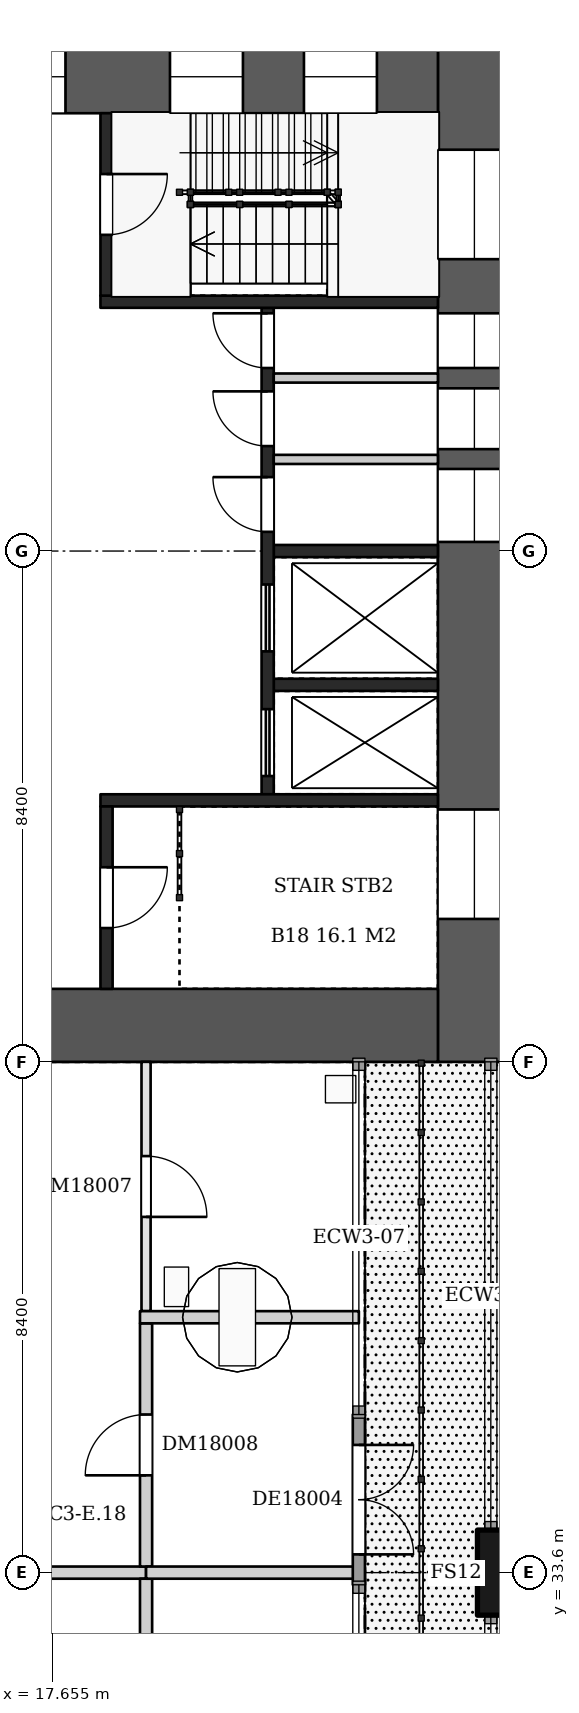
"""IFC4 building model, lengths in metres.
Left out: names, types, materials, properties, quantities, classifications, styles, units other than length and angle.
Written with IfcOpenShell. Run it as: python <this file> out.ifc"""

import sys

from ifc_helpers import new_model, si_unit, direction, frame, frame_2d, origin, origin_2d, place, context, subcontext, project, spatial, rectangle, extrude, element, fill, save


model = new_model("IFC4")
c1 = context("Model", 3, precision=1e-05, world=origin(), true_north=direction((0.0, 1.0)))
c2 = subcontext(c1, "Body", "Model", "MODEL_VIEW")
j1 = project(units=[si_unit("LENGTHUNIT", "METRE"), si_unit("PLANEANGLEUNIT", "RADIAN")], contexts=[c1])
p1 = place(None, origin())
s1 = spatial("IfcSite", under=j1, at=p1, CompositionType="ELEMENT")
p2 = place(p1, origin())
s2 = spatial("IfcBuilding", under=s1, at=p2, CompositionType="ELEMENT")
p3 = place(p2, frame((0.0, 0.0, 74.2)))
s3 = spatial("IfcBuildingStorey", under=s2, at=p3, CompositionType="ELEMENT", Elevation=74.2)
p4 = place(p3, frame((25.2, 33.6, 0.0), z_axis=(0.0, 0.0, 1.0), x_axis=(0.0, 1.0, 0.0)))
e1 = element("IfcColumn", 1, at=p4, inside=s3, PredefinedType="COLUMN", context=c2, shape_type="SweptSolid", body=[
    extrude(rectangle(XDim=1.4, YDim=1.1, at=origin_2d()), origin(), (0.0, 0.0, 1.0), 6.72),
])
p5 = place(p3, frame((24.6, 58.8, 0.0), z_axis=(0.0, 0.0, 1.0), x_axis=(0.0, -1.0, 0.0)))
e2 = element("IfcWall", 2, at=p5, inside=s3, PredefinedType="SHEAR", context=c2, shape_type="SweptSolid", body=[
    extrude(rectangle(XDim=16.8, YDim=1.2, at=frame_2d((8.4, 0.0))), origin(), (0.0, 0.0, 1.0), 6.72),
])
p6 = place(p5, frame((1.8, 0.0, 0.5)))
e3 = element("IfcOpeningElement", 3, at=p6, cuts=e2, PredefinedType="OPENING", context=c2, shape_type="SweptSolid", body=[
    extrude(rectangle(XDim=1.8, YDim=2.4, at=frame_2d((0.9, 1.2))), frame((0.0, 0.61, 0.0), z_axis=(0.0, -1.0, 0.0), x_axis=(1.0, 0.0, 0.0)), (0.0, 0.0, 1.0), 1.22),
])
p7 = place(p5, frame((4.49, 0.0, 1.6)))
e4 = element("IfcOpeningElement", 4, at=p7, cuts=e2, PredefinedType="OPENING", context=c2, shape_type="SweptSolid", body=[
    extrude(rectangle(XDim=0.9, YDim=1.2, at=frame_2d((0.45, 0.6))), frame((0.0, 0.61, 0.0), z_axis=(0.0, -1.0, 0.0), x_axis=(1.0, 0.0, 0.0)), (0.0, 0.0, 1.0), 1.22),
])
p8 = place(p5, frame((5.724, 0.0, 1.6)))
e5 = element("IfcOpeningElement", 5, at=p8, cuts=e2, PredefinedType="OPENING", context=c2, shape_type="SweptSolid", body=[
    extrude(rectangle(XDim=1.0, YDim=1.2, at=frame_2d((0.5, 0.6))), frame((0.0, 0.61, 0.0), z_axis=(0.0, -1.0, 0.0), x_axis=(1.0, 0.0, 0.0)), (0.0, 0.0, 1.0), 1.22),
])
p9 = place(p5, frame((7.05, 0.0, 1.6)))
e6 = element("IfcOpeningElement", 6, at=p9, cuts=e2, PredefinedType="OPENING", context=c2, shape_type="SweptSolid", body=[
    extrude(rectangle(XDim=1.2, YDim=1.2, at=frame_2d((0.6, 0.6))), frame((0.0, 0.61, 0.0), z_axis=(0.0, -1.0, 0.0), x_axis=(1.0, 0.0, 0.0)), (0.0, 0.0, 1.0), 1.22),
])
p10 = place(p5, frame((12.65, 0.0, 0.5)))
e7 = element("IfcOpeningElement", 7, at=p10, cuts=e2, PredefinedType="OPENING", context=c2, shape_type="SweptSolid", body=[
    extrude(rectangle(XDim=1.8, YDim=2.4, at=frame_2d((0.9, 1.2))), frame((0.0, 0.61, 0.0), z_axis=(0.0, -1.0, 0.0), x_axis=(1.0, 0.0, 0.0)), (0.0, 0.0, 1.0), 1.22),
])
p11 = place(p3, frame((9.6, 58.2, 0.0), z_axis=(0.0, 0.0, 1.0), x_axis=(1.0, 0.0, 0.0)))
e8 = element("IfcWall", 8, at=p11, inside=s3, PredefinedType="SHEAR", context=c2, shape_type="SweptSolid", body=[
    extrude(rectangle(XDim=14.4, YDim=1.2, at=frame_2d((7.2, 0.0))), origin(), (0.0, 0.0, 1.0), 6.72),
])
p12 = place(p11, frame((1.105, 0.0, 0.6)))
e9 = element("IfcOpeningElement", 9, at=p12, cuts=e8, PredefinedType="OPENING", context=c2, shape_type="SweptSolid", body=[
    extrude(rectangle(XDim=3.0, YDim=2.1, at=frame_2d((1.5, 1.05))), frame((0.0, 0.61, 0.0), z_axis=(0.0, -1.0, 0.0), x_axis=(1.0, 0.0, 0.0)), (0.0, 0.0, 1.0), 1.22),
])
p13 = place(p11, frame((5.875, 0.0, 0.6)))
e10 = element("IfcOpeningElement", 10, at=p13, cuts=e8, PredefinedType="OPENING", context=c2, shape_type="SweptSolid", body=[
    extrude(rectangle(XDim=2.4, YDim=2.1, at=frame_2d((1.2, 1.05))), frame((0.0, 0.61, 0.0), z_axis=(0.0, -1.0, 0.0), x_axis=(1.0, 0.0, 0.0)), (0.0, 0.0, 1.0), 1.22),
])
p14 = place(p11, frame((9.993, 0.0, 0.5)))
e11 = element("IfcOpeningElement", 11, at=p14, cuts=e8, PredefinedType="OPENING", context=c2, shape_type="SweptSolid", body=[
    extrude(rectangle(XDim=1.2, YDim=2.4, at=frame_2d((0.6, 1.2))), frame((0.0, 0.61, 0.0), z_axis=(0.0, -1.0, 0.0), x_axis=(1.0, 0.0, 0.0)), (0.0, 0.0, 1.0), 1.22),
])
p15 = place(p11, frame((12.197, 0.0, 0.5)))
e12 = element("IfcOpeningElement", 12, at=p15, cuts=e8, PredefinedType="OPENING", context=c2, shape_type="SweptSolid", body=[
    extrude(rectangle(XDim=1.2, YDim=2.4, at=frame_2d((0.6, 1.2))), frame((0.0, 0.61, 0.0), z_axis=(0.0, -1.0, 0.0), x_axis=(1.0, 0.0, 0.0)), (0.0, 0.0, 1.0), 1.22),
])
p16 = place(p3, frame((9.6, 42.6, 0.0), z_axis=(0.0, 0.0, 1.0), x_axis=(1.0, 0.0, 0.0)))
e13 = element("IfcWall", 13, at=p16, inside=s3, PredefinedType="SHEAR", context=c2, shape_type="SweptSolid", body=[
    extrude(rectangle(XDim=14.4, YDim=1.2, at=frame_2d((7.2, 0.0))), origin(), (0.0, 0.0, 1.0), 6.72),
])
p17 = place(p16, frame((2.1, 0.0, 0.0)))
e14 = element("IfcOpeningElement", 14, at=p17, cuts=e13, PredefinedType="OPENING", context=c2, shape_type="SweptSolid", body=[
    extrude(rectangle(XDim=1.8, YDim=2.1, at=frame_2d((0.9, 1.05))), frame((0.0, 0.61, 0.0), z_axis=(0.0, -1.0, 0.0), x_axis=(1.0, 0.0, 0.0)), (0.0, 0.0, 1.0), 1.22),
])
for number, where, z_axis, x_axis in (
    (15, (21.3, 50.4, 0.0), (0.0, 0.0, 1.0), (1.0, 0.0, 0.0)),
    (16, (21.3, 48.2, 0.0), (0.0, 0.0, 1.0), (1.0, 0.0, 0.0)),
):
    element("IfcWall", number, at=place(p3, frame(where, z_axis=z_axis, x_axis=x_axis)), inside=s3, PredefinedType="SHEAR", context=c2, shape_type="SweptSolid", body=[
        extrude(rectangle(XDim=2.7, YDim=0.2, at=frame_2d((1.35, 0.0))), origin(), (0.0, 0.0, 1.0), 6.72),
    ])
for number, where, z_axis, x_axis in (
    (17, (21.3, 53.245, 0.0), (0.0, 0.0, 1.0), (1.0, 0.0, 0.0)),
    (18, (21.3, 51.907, 0.0), (0.0, 0.0, 1.0), (1.0, 0.0, 0.0)),
):
    element("IfcWall", number, at=place(p3, frame(where, z_axis=z_axis, x_axis=x_axis)), inside=s3, PredefinedType="PARTITIONING", context=c2, shape_type="SweptSolid", body=[
        extrude(rectangle(XDim=2.7, YDim=0.15, at=frame_2d((1.35, 0.0))), origin(), (0.0, 0.0, 1.0), 6.72),
    ])
p18 = place(p3, frame((21.2, 54.4, 0.0), z_axis=(0.0, 0.0, 1.0), x_axis=(0.0, -1.0, 0.0)))
e19 = element("IfcWall", 19, at=p18, inside=s3, PredefinedType="SHEAR", context=c2, shape_type="SweptSolid", body=[
    extrude(rectangle(XDim=8.0, YDim=0.2, at=frame_2d((4.0, 0.0))), origin(), (0.0, 0.0, 1.0), 6.72),
])
p19 = place(p18, frame((0.09, 0.0, 0.0)))
e20 = element("IfcOpeningElement", 20, at=p19, cuts=e19, PredefinedType="OPENING", context=c2, shape_type="SweptSolid", body=[
    extrude(rectangle(XDim=0.9, YDim=2.1, at=frame_2d((0.45, 1.05))), frame((0.0, 0.11, 0.0), z_axis=(0.0, -1.0, 0.0), x_axis=(1.0, 0.0, 0.0)), (0.0, 0.0, 1.0), 0.22),
])
p20 = place(p18, frame((1.374, 0.0, 0.0)))
e21 = element("IfcOpeningElement", 21, at=p20, cuts=e19, PredefinedType="OPENING", context=c2, shape_type="SweptSolid", body=[
    extrude(rectangle(XDim=0.9, YDim=2.1, at=frame_2d((0.45, 1.05))), frame((0.0, 0.11, 0.0), z_axis=(0.0, -1.0, 0.0), x_axis=(1.0, 0.0, 0.0)), (0.0, 0.0, 1.0), 0.22),
])
p21 = place(p18, frame((2.784, 0.0, 0.0)))
e22 = element("IfcOpeningElement", 22, at=p21, cuts=e19, PredefinedType="OPENING", context=c2, shape_type="SweptSolid", body=[
    extrude(rectangle(XDim=0.9, YDim=2.1, at=frame_2d((0.45, 1.05))), frame((0.0, 0.11, 0.0), z_axis=(0.0, -1.0, 0.0), x_axis=(1.0, 0.0, 0.0)), (0.0, 0.0, 1.0), 0.22),
])
p22 = place(p18, frame((4.55, 0.0, 0.0)))
e23 = element("IfcOpeningElement", 23, at=p22, cuts=e19, PredefinedType="OPENING", context=c2, shape_type="SweptSolid", body=[
    extrude(rectangle(XDim=1.1, YDim=2.1, at=frame_2d((0.55, 1.05))), frame((0.0, 0.11, 0.0), z_axis=(0.0, -1.0, 0.0), x_axis=(1.0, 0.0, 0.0)), (0.0, 0.0, 1.0), 0.22),
])
p23 = place(p18, frame((6.6, 0.0, 0.0)))
e24 = element("IfcOpeningElement", 24, at=p23, cuts=e19, PredefinedType="OPENING", context=c2, shape_type="SweptSolid", body=[
    extrude(rectangle(XDim=1.1, YDim=2.1, at=frame_2d((0.55, 1.05))), frame((0.0, 0.11, 0.0), z_axis=(0.0, -1.0, 0.0), x_axis=(1.0, 0.0, 0.0)), (0.0, 0.0, 1.0), 0.22),
])
p24 = place(p3, frame((18.45, 54.5, 0.0), z_axis=(0.0, 0.0, 1.0), x_axis=(1.0, 0.0, 0.0)))
e25 = element("IfcWall", 25, at=p24, inside=s3, PredefinedType="SHEAR", context=c2, shape_type="SweptSolid", body=[
    extrude(rectangle(XDim=5.55, YDim=0.2, at=frame_2d((2.775, 0.0))), origin(), (0.0, 0.0, 1.0), 6.72),
])
p25 = place(p3, frame((18.55, 57.6, 0.0), z_axis=(0.0, 0.0, 1.0), x_axis=(0.0, -1.0, 0.0)))
e26 = element("IfcWall", 26, at=p25, inside=s3, PredefinedType="SHEAR", context=c2, shape_type="SweptSolid", body=[
    extrude(rectangle(XDim=3.0, YDim=0.2, at=frame_2d((1.5, 0.0))), origin(), (0.0, 0.0, 1.0), 6.72),
])
p26 = place(p25, frame((1.0, 0.0, 0.0)))
e27 = element("IfcOpeningElement", 27, at=p26, cuts=e26, PredefinedType="OPENING", context=c2, shape_type="SweptSolid", body=[
    extrude(rectangle(XDim=1.0, YDim=2.1, at=frame_2d((0.5, 1.05))), frame((0.0, 0.11, 0.0), z_axis=(0.0, -1.0, 0.0), x_axis=(1.0, 0.0, 0.0)), (0.0, 0.0, 1.0), 0.22),
])
p27 = place(p3, frame((18.45, 46.3, 0.0), z_axis=(0.0, 0.0, 1.0), x_axis=(1.0, 0.0, 0.0)))
e28 = element("IfcWall", 28, at=p27, inside=s3, PredefinedType="SHEAR", context=c2, shape_type="SweptSolid", body=[
    extrude(rectangle(XDim=5.55, YDim=0.2, at=frame_2d((2.775, 0.0))), origin(), (0.0, 0.0, 1.0), 6.72),
])
p28 = place(p3, frame((18.55, 46.2, 0.0), z_axis=(0.0, 0.0, 1.0), x_axis=(0.0, -1.0, 0.0)))
e29 = element("IfcWall", 29, at=p28, inside=s3, PredefinedType="SHEAR", context=c2, shape_type="SweptSolid", body=[
    extrude(rectangle(XDim=3.0, YDim=0.2, at=frame_2d((1.5, 0.0))), origin(), (0.0, 0.0, 1.0), 6.72),
])
p29 = place(p28, frame((1.0, 0.0, 0.0)))
e30 = element("IfcOpeningElement", 30, at=p29, cuts=e29, PredefinedType="OPENING", context=c2, shape_type="SweptSolid", body=[
    extrude(rectangle(XDim=1.0, YDim=2.1, at=frame_2d((0.5, 1.05))), frame((0.0, 0.11, 0.0), z_axis=(0.0, -1.0, 0.0), x_axis=(1.0, 0.0, 0.0)), (0.0, 0.0, 1.0), 0.22),
])
p30 = place(p3, frame((17.45, 33.6, 0.0), z_axis=(0.0, 0.0, 1.0), x_axis=(1.0, 0.0, 0.0)))
e31 = element("IfcWall", 31, at=p30, inside=s3, PredefinedType="PARTITIONING", context=c2, shape_type="SweptSolid", body=[
    extrude(rectangle(XDim=1.75, YDim=0.2, at=frame_2d((0.875, 0.0))), origin(), (0.0, 0.0, 1.0), 6.72),
])
p31 = place(p3, frame((19.2, 25.3, 0.0), z_axis=(0.0, 0.0, 1.0), x_axis=(0.0, 1.0, 0.0)))
e32 = element("IfcWall", 32, at=p31, inside=s3, PredefinedType="PARTITIONING", context=c2, shape_type="SweptSolid", body=[
    extrude(rectangle(XDim=8.2, YDim=0.2, at=frame_2d((4.1, 0.0))), origin(), (0.0, 0.0, 1.0), 6.72),
])
p32 = place(p31, frame((3.1, 0.0, 0.0)))
e33 = element("IfcOpeningElement", 33, at=p32, cuts=e32, PredefinedType="OPENING", context=c2, shape_type="SweptSolid", body=[
    extrude(rectangle(XDim=2.0, YDim=2.1, at=frame_2d((1.0, 1.05))), frame((0.0, 0.11, 0.0), z_axis=(0.0, -1.0, 0.0), x_axis=(1.0, 0.0, 0.0)), (0.0, 0.0, 1.0), 0.22),
])
p33 = place(p3, frame((19.2, 33.7, 0.0), z_axis=(0.0, 0.0, 1.0), x_axis=(0.0, 1.0, 0.0)))
e34 = element("IfcWall", 34, at=p33, inside=s3, PredefinedType="PARTITIONING", context=c2, shape_type="SweptSolid", body=[
    extrude(rectangle(XDim=4.0, YDim=0.2, at=frame_2d((2.0, 0.0))), origin(), (0.0, 0.0, 1.0), 6.72),
])
p34 = place(p33, frame((1.5, 0.0, 0.0)))
e35 = element("IfcOpeningElement", 35, at=p34, cuts=e34, PredefinedType="OPENING", context=c2, shape_type="SweptSolid", body=[
    extrude(rectangle(XDim=1.0, YDim=2.1, at=frame_2d((0.5, 1.05))), frame((0.0, 0.11, 0.0), z_axis=(0.0, -1.0, 0.0), x_axis=(1.0, 0.0, 0.0)), (0.0, 0.0, 1.0), 0.22),
])
p35 = place(p3, frame((19.2, 33.6, 0.0), z_axis=(0.0, 0.0, 1.0), x_axis=(1.0, 0.0, 0.0)))
e36 = element("IfcWall", 36, at=p35, inside=s3, PredefinedType="PARTITIONING", context=c2, shape_type="SweptSolid", body=[
    extrude(rectangle(XDim=3.5, YDim=0.2, at=frame_2d((1.75, 0.0))), origin(), (0.0, 0.0, 1.0), 6.72),
])
p36 = place(p3, frame((19.2, 37.9, 0.0), z_axis=(0.0, 0.0, 1.0), x_axis=(0.0, 1.0, 0.0)))
e37 = element("IfcWall", 37, at=p36, inside=s3, PredefinedType="PARTITIONING", context=c2, shape_type="SweptSolid", body=[
    extrude(rectangle(XDim=4.1, YDim=0.15, at=frame_2d((2.05, 0.0))), origin(), (0.0, 0.0, 1.0), 6.72),
])
p37 = place(p36, frame((1.55, 0.0, 0.0)))
e38 = element("IfcOpeningElement", 38, at=p37, cuts=e37, PredefinedType="OPENING", context=c2, shape_type="SweptSolid", body=[
    extrude(rectangle(XDim=1.0, YDim=2.1, at=frame_2d((0.5, 1.05))), frame((0.0, 0.085, 0.0), z_axis=(0.0, -1.0, 0.0), x_axis=(1.0, 0.0, 0.0)), (0.0, 0.0, 1.0), 0.17),
])
p38 = place(p3, frame((19.1, 37.8, 0.0), z_axis=(0.0, 0.0, 1.0), x_axis=(1.0, 0.0, 0.0)))
e39 = element("IfcWall", 39, at=p38, inside=s3, PredefinedType="PARTITIONING", context=c2, shape_type="SweptSolid", body=[
    extrude(rectangle(XDim=3.6, YDim=0.2, at=frame_2d((1.8, 0.0))), origin(), (0.0, 0.0, 1.0), 6.72),
])
p39 = place(p3, frame((22.7, 33.4, 0.0), z_axis=(0.0, 0.0, 1.0), x_axis=(0.0, 1.0, 0.0)))
e40 = element("IfcWall", 40, at=p39, inside=s3, PredefinedType="SOLIDWALL", context=c2, shape_type="SweptSolid", body=[
    extrude(rectangle(XDim=2.8, YDim=0.2, at=frame_2d((1.4, 0.0))), origin(), (0.0, 0.0, 1.0), 6.72),
])
p40 = place(p39, frame((0.5, 0.0, 0.0)))
e41 = element("IfcOpeningElement", 41, at=p40, cuts=e40, PredefinedType="OPENING", context=c2, shape_type="SweptSolid", body=[
    extrude(rectangle(XDim=1.8, YDim=2.4, at=frame_2d((0.9, 1.2))), frame((0.0, 0.11, 0.0), z_axis=(0.0, -1.0, 0.0), x_axis=(1.0, 0.0, 0.0)), (0.0, 0.0, 1.0), 0.22),
])
p41 = place(p19, frame((0.9, 0.0, 0.0), z_axis=(0.0, 0.0, 1.0), x_axis=(-1.0, 0.0, 0.0)))
e42 = element("IfcDoor", 42, at=p41, inside=s3, OperationType="SINGLE_SWING_RIGHT", PredefinedType="DOOR", context=c2, shape_type="SweptSolid", body=[
    extrude(rectangle(XDim=0.9, YDim=2.1, at=frame_2d((0.45, 1.05))), frame((0.0, 0.025, 0.0), z_axis=(0.0, -1.0, 0.0), x_axis=(1.0, 0.0, 0.0)), (0.0, 0.0, 1.0), 0.05),
])
fill(e20, e42)
p42 = place(p20, frame((0.9, 0.0, 0.0), z_axis=(0.0, 0.0, 1.0), x_axis=(-1.0, 0.0, 0.0)))
e43 = element("IfcDoor", 43, at=p42, inside=s3, OperationType="SINGLE_SWING_RIGHT", PredefinedType="DOOR", context=c2, shape_type="SweptSolid", body=[
    extrude(rectangle(XDim=0.9, YDim=2.1, at=frame_2d((0.45, 1.05))), frame((0.0, 0.025, 0.0), z_axis=(0.0, -1.0, 0.0), x_axis=(1.0, 0.0, 0.0)), (0.0, 0.0, 1.0), 0.05),
])
fill(e21, e43)
p43 = place(p21, frame((0.9, 0.0, 0.0), z_axis=(0.0, 0.0, 1.0), x_axis=(-1.0, 0.0, 0.0)))
e44 = element("IfcDoor", 44, at=p43, inside=s3, OperationType="SINGLE_SWING_RIGHT", PredefinedType="DOOR", context=c2, shape_type="SweptSolid", body=[
    extrude(rectangle(XDim=0.9, YDim=2.1, at=frame_2d((0.45, 1.05))), frame((0.0, 0.025, 0.0), z_axis=(0.0, -1.0, 0.0), x_axis=(1.0, 0.0, 0.0)), (0.0, 0.0, 1.0), 0.05),
])
fill(e22, e44)
p44 = place(p22, origin())
e45 = element("IfcDoor", 45, at=p44, inside=s3, OperationType="DOUBLE_DOOR_SLIDING", PredefinedType="DOOR", context=c2, shape_type="SweptSolid", body=[
    extrude(rectangle(XDim=1.1, YDim=2.1, at=frame_2d((0.55, 1.05))), frame((0.0, 0.025, 0.0), z_axis=(0.0, -1.0, 0.0), x_axis=(1.0, 0.0, 0.0)), (0.0, 0.0, 1.0), 0.05),
])
fill(e23, e45)
p45 = place(p23, origin())
e46 = element("IfcDoor", 46, at=p45, inside=s3, OperationType="DOUBLE_DOOR_SLIDING", PredefinedType="DOOR", context=c2, shape_type="SweptSolid", body=[
    extrude(rectangle(XDim=1.1, YDim=2.1, at=frame_2d((0.55, 1.05))), frame((0.0, 0.025, 0.0), z_axis=(0.0, -1.0, 0.0), x_axis=(1.0, 0.0, 0.0)), (0.0, 0.0, 1.0), 0.05),
])
fill(e24, e46)
p46 = place(p26, origin())
e47 = element("IfcDoor", 47, at=p46, inside=s3, OperationType="SINGLE_SWING_LEFT", PredefinedType="DOOR", context=c2, shape_type="SweptSolid", body=[
    extrude(rectangle(XDim=1.0, YDim=2.1, at=frame_2d((0.5, 1.05))), frame((0.0, 0.025, 0.0), z_axis=(0.0, -1.0, 0.0), x_axis=(1.0, 0.0, 0.0)), (0.0, 0.0, 1.0), 0.05),
])
fill(e27, e47)
p47 = place(p29, origin())
e48 = element("IfcDoor", 48, at=p47, inside=s3, OperationType="SINGLE_SWING_LEFT", PredefinedType="DOOR", context=c2, shape_type="SweptSolid", body=[
    extrude(rectangle(XDim=1.0, YDim=2.1, at=frame_2d((0.5, 1.05))), frame((0.0, 0.025, 0.0), z_axis=(0.0, -1.0, 0.0), x_axis=(1.0, 0.0, 0.0)), (0.0, 0.0, 1.0), 0.05),
])
fill(e30, e48)
p48 = place(p6, origin())
e49 = element("IfcWindow", 49, at=p48, inside=s3, PartitioningType="SINGLE_PANEL", PredefinedType="WINDOW", context=c2, shape_type="SweptSolid", body=[
    extrude(rectangle(XDim=1.8, YDim=2.4, at=frame_2d((0.9, 1.2))), frame((0.0, 0.03, 0.0), z_axis=(0.0, -1.0, 0.0), x_axis=(1.0, 0.0, 0.0)), (0.0, 0.0, 1.0), 0.06),
])
fill(e3, e49)
p49 = place(p7, origin())
e50 = element("IfcWindow", 50, at=p49, inside=s3, PartitioningType="SINGLE_PANEL", PredefinedType="WINDOW", context=c2, shape_type="SweptSolid", body=[
    extrude(rectangle(XDim=0.9, YDim=1.2, at=frame_2d((0.45, 0.6))), frame((0.0, 0.03, 0.0), z_axis=(0.0, -1.0, 0.0), x_axis=(1.0, 0.0, 0.0)), (0.0, 0.0, 1.0), 0.06),
])
fill(e4, e50)
p50 = place(p8, origin())
e51 = element("IfcWindow", 51, at=p50, inside=s3, PartitioningType="SINGLE_PANEL", PredefinedType="WINDOW", context=c2, shape_type="SweptSolid", body=[
    extrude(rectangle(XDim=1.0, YDim=1.2, at=frame_2d((0.5, 0.6))), frame((0.0, 0.03, 0.0), z_axis=(0.0, -1.0, 0.0), x_axis=(1.0, 0.0, 0.0)), (0.0, 0.0, 1.0), 0.06),
])
fill(e5, e51)
p51 = place(p9, origin())
e52 = element("IfcWindow", 52, at=p51, inside=s3, PartitioningType="SINGLE_PANEL", PredefinedType="WINDOW", context=c2, shape_type="SweptSolid", body=[
    extrude(rectangle(XDim=1.2, YDim=1.2, at=frame_2d((0.6, 0.6))), frame((0.0, 0.03, 0.0), z_axis=(0.0, -1.0, 0.0), x_axis=(1.0, 0.0, 0.0)), (0.0, 0.0, 1.0), 0.06),
])
fill(e6, e52)
p52 = place(p10, origin())
e53 = element("IfcWindow", 53, at=p52, inside=s3, PartitioningType="SINGLE_PANEL", PredefinedType="WINDOW", context=c2, shape_type="SweptSolid", body=[
    extrude(rectangle(XDim=1.8, YDim=2.4, at=frame_2d((0.9, 1.2))), frame((0.0, 0.03, 0.0), z_axis=(0.0, -1.0, 0.0), x_axis=(1.0, 0.0, 0.0)), (0.0, 0.0, 1.0), 0.06),
])
fill(e7, e53)
p53 = place(p13, origin())
e54 = element("IfcWindow", 54, at=p53, inside=s3, PartitioningType="SINGLE_PANEL", PredefinedType="WINDOW", context=c2, shape_type="SweptSolid", body=[
    extrude(rectangle(XDim=2.4, YDim=2.1, at=frame_2d((1.2, 1.05))), frame((0.0, 0.03, 0.0), z_axis=(0.0, -1.0, 0.0), x_axis=(1.0, 0.0, 0.0)), (0.0, 0.0, 1.0), 0.06),
])
fill(e10, e54)
p54 = place(p14, origin())
e55 = element("IfcWindow", 55, at=p54, inside=s3, PartitioningType="SINGLE_PANEL", PredefinedType="WINDOW", context=c2, shape_type="SweptSolid", body=[
    extrude(rectangle(XDim=1.2, YDim=2.4, at=frame_2d((0.6, 1.2))), frame((0.0, 0.03, 0.0), z_axis=(0.0, -1.0, 0.0), x_axis=(1.0, 0.0, 0.0)), (0.0, 0.0, 1.0), 0.06),
])
fill(e11, e55)
p55 = place(p15, origin())
e56 = element("IfcWindow", 56, at=p55, inside=s3, PartitioningType="SINGLE_PANEL", PredefinedType="WINDOW", context=c2, shape_type="SweptSolid", body=[
    extrude(rectangle(XDim=1.2, YDim=2.4, at=frame_2d((0.6, 1.2))), frame((0.0, 0.03, 0.0), z_axis=(0.0, -1.0, 0.0), x_axis=(1.0, 0.0, 0.0)), (0.0, 0.0, 1.0), 0.06),
])
fill(e12, e56)
p56 = place(p37, frame((1.0, 0.0, 0.0), z_axis=(0.0, 0.0, 1.0), x_axis=(-1.0, 0.0, 0.0)))
e57 = element("IfcDoor", 57, at=p56, inside=s3, OperationType="SINGLE_SWING_RIGHT", PredefinedType="DOOR", context=c2, shape_type="SweptSolid", body=[
    extrude(rectangle(XDim=1.0, YDim=2.1, at=frame_2d((0.5, 1.05))), frame((0.0, 0.025, 0.0), z_axis=(0.0, -1.0, 0.0), x_axis=(1.0, 0.0, 0.0)), (0.0, 0.0, 1.0), 0.05),
])
fill(e38, e57)
p57 = place(p34, origin())
e58 = element("IfcDoor", 58, at=p57, inside=s3, OperationType="SINGLE_SWING_LEFT", PredefinedType="DOOR", context=c2, shape_type="SweptSolid", body=[
    extrude(rectangle(XDim=1.0, YDim=2.1, at=frame_2d((0.5, 1.05))), frame((0.0, 0.025, 0.0), z_axis=(0.0, -1.0, 0.0), x_axis=(1.0, 0.0, 0.0)), (0.0, 0.0, 1.0), 0.05),
])
fill(e35, e58)
p58 = place(p40, frame((1.8, 0.0, 0.0), z_axis=(0.0, 0.0, 1.0), x_axis=(-1.0, 0.0, 0.0)))
e59 = element("IfcDoor", 59, at=p58, inside=s3, OperationType="DOUBLE_DOOR_SINGLE_SWING", PredefinedType="DOOR", context=c2, shape_type="SweptSolid", body=[
    extrude(rectangle(XDim=1.8, YDim=2.4, at=frame_2d((0.9, 1.2))), frame((0.0, 0.025, 0.0), z_axis=(0.0, -1.0, 0.0), x_axis=(1.0, 0.0, 0.0)), (0.0, 0.0, 1.0), 0.05),
])
fill(e41, e59)
save(model, sys.argv[1])
